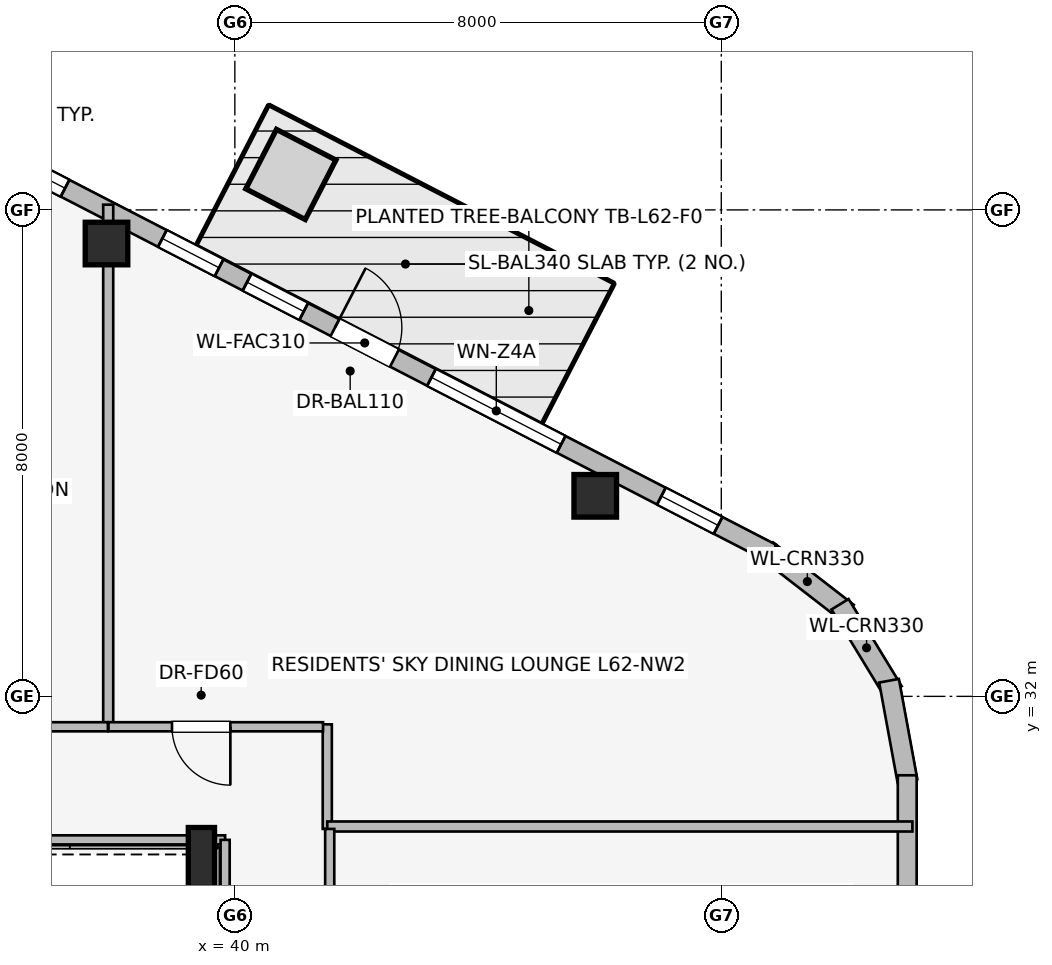
"""IFC4 building model, lengths in metres.
Left out: names, types, materials, properties, quantities, classifications, styles, units other than length and angle.
Written with IfcOpenShell. Run it as: python <this file> out.ifc"""

import sys

from ifc_helpers import new_model, si_unit, direction, frame, frame_2d, origin, origin_2d, place, context, subcontext, project, spatial, rectangle, i_section, extrude, element, fill, save


model = new_model("IFC4")
c1 = context("Model", 3, precision=1e-05, world=origin(), true_north=direction((0.0, 1.0)))
c2 = subcontext(c1, "Body", "Model", "MODEL_VIEW")
j1 = project(units=[si_unit("LENGTHUNIT", "METRE"), si_unit("PLANEANGLEUNIT", "RADIAN")], contexts=[c1])
p1 = place(None, origin())
s1 = spatial("IfcSite", under=j1, at=p1, CompositionType="ELEMENT")
p2 = place(p1, origin())
s2 = spatial("IfcBuilding", under=s1, at=p2, CompositionType="ELEMENT")
p3 = place(p2, frame((0.0, 0.0, 227.7)))
s3 = spatial("IfcBuildingStorey", under=s2, at=p3, CompositionType="ELEMENT", Elevation=227.7)
for number, where, z_axis, x_axis in (
    (1, (45.927, 35.298, 0.0), (0.0, 0.0, 1.0), (1.0, 0.0, 0.0)),
    (2, (37.889, 39.447, 0.0), (0.0, 0.0, 1.0), (1.0, 0.0, 0.0)),
):
    element("IfcColumn", number, at=place(p3, frame(where, z_axis=z_axis, x_axis=x_axis)), inside=s3, PredefinedType="COLUMN", context=c2, shape_type="SweptSolid", body=[
        extrude(rectangle(XDim=0.7, YDim=0.7, at=origin_2d()), origin(), (0.0, 0.0, 1.0), 3.55),
    ])
p4 = place(p3, frame((39.45, 29.35, 0.0), z_axis=(0.0, 0.0, 1.0), x_axis=(1.0, 0.0, 0.0)))
e3 = element("IfcColumn", 3, at=p4, inside=s3, PredefinedType="COLUMN", context=c2, shape_type="SweptSolid", body=[
    extrude(i_section(OverallWidth=0.431, OverallDepth=0.987, WebThickness=0.034, FlangeThickness=0.062, at=origin_2d()), origin(), (0.0, 0.0, 1.0), 3.55),
])
p5 = place(p3, frame((48.753, 34.401, 0.0), z_axis=(0.0, 0.0, 1.0), x_axis=(0.790691856293, -0.61221433207, 0.0)))
e4 = element("IfcWall", 4, at=p5, inside=s3, PredefinedType="STANDARD", context=c2, shape_type="SweptSolid", body=[
    extrude(rectangle(XDim=1.676, YDim=0.33, at=frame_2d((0.838, 0.0))), origin(), (0.0, 0.0, 1.0), 3.29),
])
p6 = place(p3, frame((49.953, 33.515, 0.0), z_axis=(0.0, 0.0, 1.0), x_axis=(0.520325409202, -0.853968072318, 0.0)))
e5 = element("IfcWall", 5, at=p6, inside=s3, PredefinedType="STANDARD", context=c2, shape_type="SweptSolid", body=[
    extrude(rectangle(XDim=1.678, YDim=0.33, at=frame_2d((0.839, 0.0))), origin(), (0.0, 0.0, 1.0), 3.29),
])
p7 = place(p3, frame((50.759, 32.257, 0.0), z_axis=(0.0, 0.0, 1.0), x_axis=(0.180691763044, -0.983539773862, 0.0)))
e6 = element("IfcWall", 6, at=p7, inside=s3, PredefinedType="STANDARD", context=c2, shape_type="SweptSolid", body=[
    extrude(rectangle(XDim=1.677, YDim=0.33, at=frame_2d((0.838, 0.0))), origin(), (0.0, 0.0, 1.0), 3.29),
])
p8 = place(p3, frame((35.437, 41.27, 0.0), z_axis=(0.0, 0.0, 1.0), x_axis=(0.888581481622, -0.458718814218, 0.0)))
e7 = element("IfcWall", 7, at=p8, inside=s3, PredefinedType="STANDARD", context=c2, shape_type="SweptSolid", body=[
    extrude(rectangle(XDim=15.077, YDim=0.31, at=frame_2d((7.539, 0.0))), origin(), (0.0, 0.0, 1.0), 3.29),
])
p9 = place(p8, frame((6.988, 0.0, 0.0)))
e8 = element("IfcOpeningElement", 8, at=p9, cuts=e7, PredefinedType="OPENING", context=c2, shape_type="SweptSolid", body=[
    extrude(rectangle(XDim=1.1, YDim=2.04, at=frame_2d((0.55, 1.02))), frame((0.0, 0.165, 0.0), z_axis=(0.0, -1.0, 0.0), x_axis=(1.0, 0.0, 0.0)), (0.0, 0.0, 1.0), 0.33),
])
p10 = place(p8, frame((0.942, 0.0, 0.75)))
e9 = element("IfcOpeningElement", 9, at=p10, cuts=e7, PredefinedType="OPENING", context=c2, shape_type="SweptSolid", body=[
    extrude(rectangle(XDim=1.05, YDim=1.4, at=frame_2d((0.525, 0.7))), frame((0.0, 0.165, 0.0), z_axis=(0.0, -1.0, 0.0), x_axis=(1.0, 0.0, 0.0)), (0.0, 0.0, 1.0), 0.33),
])
p11 = place(p8, frame((3.793, 0.0, 0.75)))
e10 = element("IfcOpeningElement", 10, at=p11, cuts=e7, PredefinedType="OPENING", context=c2, shape_type="SweptSolid", body=[
    extrude(rectangle(XDim=1.05, YDim=1.4, at=frame_2d((0.525, 0.7))), frame((0.0, 0.165, 0.0), z_axis=(0.0, -1.0, 0.0), x_axis=(1.0, 0.0, 0.0)), (0.0, 0.0, 1.0), 0.33),
])
p12 = place(p8, frame((5.36, 0.0, 0.75)))
e11 = element("IfcOpeningElement", 11, at=p12, cuts=e7, PredefinedType="OPENING", context=c2, shape_type="SweptSolid", body=[
    extrude(rectangle(XDim=1.05, YDim=1.4, at=frame_2d((0.525, 0.7))), frame((0.0, 0.165, 0.0), z_axis=(0.0, -1.0, 0.0), x_axis=(1.0, 0.0, 0.0)), (0.0, 0.0, 1.0), 0.33),
])
p13 = place(p8, frame((8.774, 0.0, 0.75)))
e12 = element("IfcOpeningElement", 12, at=p13, cuts=e7, PredefinedType="OPENING", context=c2, shape_type="SweptSolid", body=[
    extrude(rectangle(XDim=2.4, YDim=1.6, at=frame_2d((1.2, 0.8))), frame((0.0, 0.165, 0.0), z_axis=(0.0, -1.0, 0.0), x_axis=(1.0, 0.0, 0.0)), (0.0, 0.0, 1.0), 0.33),
])
p14 = place(p8, frame((13.029, 0.0, 0.75)))
e13 = element("IfcOpeningElement", 13, at=p14, cuts=e7, PredefinedType="OPENING", context=c2, shape_type="SweptSolid", body=[
    extrude(rectangle(XDim=1.05, YDim=1.4, at=frame_2d((0.525, 0.7))), frame((0.0, 0.165, 0.0), z_axis=(0.0, -1.0, 0.0), x_axis=(1.0, 0.0, 0.0)), (0.0, 0.0, 1.0), 0.33),
])
p15 = place(p3, frame((51.058, 30.702, 0.0), z_axis=(0.0, 0.0, 1.0), x_axis=(0.0, -1.0, 0.0)))
e14 = element("IfcWall", 14, at=p15, inside=s3, PredefinedType="STANDARD", context=c2, shape_type="SweptSolid", body=[
    extrude(rectangle(XDim=13.404, YDim=0.31, at=frame_2d((6.702, 0.0))), origin(), (0.0, 0.0, 1.0), 3.29),
])
p16 = place(p15, frame((5.386, 0.0, 0.75)))
e15 = element("IfcOpeningElement", 15, at=p16, cuts=e14, PredefinedType="OPENING", context=c2, shape_type="SweptSolid", body=[
    extrude(rectangle(XDim=2.4, YDim=1.6, at=frame_2d((1.2, 0.8))), frame((0.0, 0.165, 0.0), z_axis=(0.0, -1.0, 0.0), x_axis=(1.0, 0.0, 0.0)), (0.0, 0.0, 1.0), 0.33),
])
p17 = place(p15, frame((9.04, 0.0, 0.75)))
e16 = element("IfcOpeningElement", 16, at=p17, cuts=e14, PredefinedType="OPENING", context=c2, shape_type="SweptSolid", body=[
    extrude(rectangle(XDim=1.05, YDim=1.4, at=frame_2d((0.525, 0.7))), frame((0.0, 0.165, 0.0), z_axis=(0.0, -1.0, 0.0), x_axis=(1.0, 0.0, 0.0)), (0.0, 0.0, 1.0), 0.33),
])
p18 = place(p3, frame((39.84, 29.64, 0.0), z_axis=(0.0, 0.0, 1.0), x_axis=(-1.0, 0.0, 0.0)))
e17 = element("IfcWall", 17, at=p18, inside=s3, PredefinedType="PARTITIONING", context=c2, shape_type="SweptSolid", body=[
    extrude(rectangle(XDim=12.203, YDim=0.15, at=frame_2d((6.102, 0.0))), origin(), (0.0, 0.0, 1.0), 2.431),
])
p19 = place(p3, frame((39.84, 18.36, 0.0), z_axis=(0.0, 0.0, 1.0), x_axis=(0.0, 1.0, 0.0)))
e18 = element("IfcWall", 18, at=p19, inside=s3, PredefinedType="PARTITIONING", context=c2, shape_type="SweptSolid", body=[
    extrude(rectangle(XDim=11.28, YDim=0.15, at=frame_2d((5.64, 0.0))), origin(), (0.0, 0.0, 1.0), 3.29),
])
p20 = place(p3, frame((41.52, 29.82, 0.0), z_axis=(0.0, 0.0, 1.0), x_axis=(0.0, 1.0, 0.0)))
e19 = element("IfcWall", 19, at=p20, inside=s3, PredefinedType="PARTITIONING", context=c2, shape_type="SweptSolid", body=[
    extrude(rectangle(XDim=1.72, YDim=0.15, at=frame_2d((0.86, 0.0))), origin(), (0.0, 0.0, 1.0), 3.29),
])
p21 = place(p3, frame((37.917, 31.51, 0.0), z_axis=(0.0, 0.0, 1.0), x_axis=(0.0, 1.0, 0.0)))
e20 = element("IfcWall", 20, at=p21, inside=s3, PredefinedType="PARTITIONING", context=c2, shape_type="SweptSolid", body=[
    extrude(rectangle(XDim=8.576, YDim=0.165, at=frame_2d((4.288, 0.0))), origin(), (0.0, 0.0, 1.0), 2.679),
])
p22 = place(p3, frame((37.912, 31.5, 0.0), z_axis=(0.0, 0.0, 1.0), x_axis=(-1.0, 0.0, 0.0)))
e21 = element("IfcWall", 21, at=p22, inside=s3, PredefinedType="PARTITIONING", context=c2, shape_type="SweptSolid", body=[
    extrude(rectangle(XDim=3.622, YDim=0.15, at=frame_2d((1.811, 0.0))), origin(), (0.0, 0.0, 1.0), 3.29),
])
p23 = place(p22, frame((1.212, 0.0, 0.0)))
e22 = element("IfcOpeningElement", 22, at=p23, cuts=e21, PredefinedType="OPENING", context=c2, shape_type="SweptSolid", body=[
    extrude(rectangle(XDim=0.96, YDim=2.0, at=frame_2d((0.48, 1.0))), frame((0.0, 0.085, 0.0), z_axis=(0.0, -1.0, 0.0), x_axis=(1.0, 0.0, 0.0)), (0.0, 0.0, 1.0), 0.17),
])
p24 = place(p3, frame((41.45, 31.5, 0.0), z_axis=(0.0, 0.0, 1.0), x_axis=(-1.0, 0.0, 0.0)))
e23 = element("IfcWall", 23, at=p24, inside=s3, PredefinedType="PARTITIONING", context=c2, shape_type="SweptSolid", body=[
    extrude(rectangle(XDim=3.528, YDim=0.15, at=frame_2d((1.764, 0.0))), origin(), (0.0, 0.0, 1.0), 3.29),
])
p25 = place(p24, frame((1.524, 0.0, 0.0)))
e24 = element("IfcOpeningElement", 24, at=p25, cuts=e23, PredefinedType="OPENING", context=c2, shape_type="SweptSolid", body=[
    extrude(rectangle(XDim=0.96, YDim=2.0, at=frame_2d((0.48, 1.0))), frame((0.0, 0.085, 0.0), z_axis=(0.0, -1.0, 0.0), x_axis=(1.0, 0.0, 0.0)), (0.0, 0.0, 1.0), 0.17),
])
p26 = place(p3, frame((41.52, 29.86, 0.0), z_axis=(0.0, 0.0, 1.0), x_axis=(1.0, 0.0, 0.0)))
e25 = element("IfcWall", 25, at=p26, inside=s3, PredefinedType="PARTITIONING", context=c2, shape_type="SweptSolid", body=[
    extrude(rectangle(XDim=9.623, YDim=0.165, at=frame_2d((4.812, 0.0))), origin(), (0.0, 0.0, 1.0), 3.29),
])
p27 = place(p3, frame((41.56, 26.113, 0.0), z_axis=(0.0, 0.0, 1.0), x_axis=(0.0, 1.0, 0.0)))
e26 = element("IfcWall", 26, at=p27, inside=s3, PredefinedType="PARTITIONING", context=c2, shape_type="SweptSolid", body=[
    extrude(rectangle(XDim=3.707, YDim=0.15, at=frame_2d((1.854, 0.0))), origin(), (0.0, 0.0, 1.0), 3.29),
])
p28 = place(p27, frame((1.374, 0.0, 0.0)))
e27 = element("IfcOpeningElement", 27, at=p28, cuts=e26, PredefinedType="OPENING", context=c2, shape_type="SweptSolid", body=[
    extrude(rectangle(XDim=0.96, YDim=2.0, at=frame_2d((0.48, 1.0))), frame((0.0, 0.085, 0.0), z_axis=(0.0, -1.0, 0.0), x_axis=(1.0, 0.0, 0.0)), (0.0, 0.0, 1.0), 0.17),
])
p29 = place(p9, origin())
e28 = element("IfcDoor", 28, at=p29, inside=s3, OperationType="SINGLE_SWING_LEFT", PredefinedType="DOOR", context=c2, shape_type="SweptSolid", body=[
    extrude(rectangle(XDim=1.1, YDim=2.04, at=frame_2d((0.55, 1.02))), frame((0.0, 0.025, 0.0), z_axis=(0.0, -1.0, 0.0), x_axis=(1.0, 0.0, 0.0)), (0.0, 0.0, 1.0), 0.05),
])
fill(e8, e28)
p30 = place(p10, origin())
e29 = element("IfcWindow", 29, at=p30, inside=s3, PartitioningType="SINGLE_PANEL", PredefinedType="WINDOW", context=c2, shape_type="SweptSolid", body=[
    extrude(rectangle(XDim=1.05, YDim=1.4, at=frame_2d((0.525, 0.7))), frame((0.0, 0.03, 0.0), z_axis=(0.0, -1.0, 0.0), x_axis=(1.0, 0.0, 0.0)), (0.0, 0.0, 1.0), 0.06),
])
fill(e9, e29)
p31 = place(p11, origin())
e30 = element("IfcWindow", 30, at=p31, inside=s3, PartitioningType="SINGLE_PANEL", PredefinedType="WINDOW", context=c2, shape_type="SweptSolid", body=[
    extrude(rectangle(XDim=1.05, YDim=1.4, at=frame_2d((0.525, 0.7))), frame((0.0, 0.03, 0.0), z_axis=(0.0, -1.0, 0.0), x_axis=(1.0, 0.0, 0.0)), (0.0, 0.0, 1.0), 0.06),
])
fill(e10, e30)
p32 = place(p12, origin())
e31 = element("IfcWindow", 31, at=p32, inside=s3, PartitioningType="SINGLE_PANEL", PredefinedType="WINDOW", context=c2, shape_type="SweptSolid", body=[
    extrude(rectangle(XDim=1.05, YDim=1.4, at=frame_2d((0.525, 0.7))), frame((0.0, 0.03, 0.0), z_axis=(0.0, -1.0, 0.0), x_axis=(1.0, 0.0, 0.0)), (0.0, 0.0, 1.0), 0.06),
])
fill(e11, e31)
p33 = place(p13, origin())
e32 = element("IfcWindow", 32, at=p33, inside=s3, PartitioningType="SINGLE_PANEL", PredefinedType="WINDOW", context=c2, shape_type="SweptSolid", body=[
    extrude(rectangle(XDim=2.4, YDim=1.6, at=frame_2d((1.2, 0.8))), frame((0.0, 0.03, 0.0), z_axis=(0.0, -1.0, 0.0), x_axis=(1.0, 0.0, 0.0)), (0.0, 0.0, 1.0), 0.06),
])
fill(e12, e32)
p34 = place(p14, origin())
e33 = element("IfcWindow", 33, at=p34, inside=s3, PartitioningType="SINGLE_PANEL", PredefinedType="WINDOW", context=c2, shape_type="SweptSolid", body=[
    extrude(rectangle(XDim=1.05, YDim=1.4, at=frame_2d((0.525, 0.7))), frame((0.0, 0.03, 0.0), z_axis=(0.0, -1.0, 0.0), x_axis=(1.0, 0.0, 0.0)), (0.0, 0.0, 1.0), 0.06),
])
fill(e13, e33)
p35 = place(p25, origin())
e34 = element("IfcDoor", 34, at=p35, inside=s3, OperationType="SINGLE_SWING_LEFT", PredefinedType="DOOR", context=c2, shape_type="SweptSolid", body=[
    extrude(rectangle(XDim=0.96, YDim=2.0, at=frame_2d((0.48, 1.0))), frame((0.0, 0.025, 0.0), z_axis=(0.0, -1.0, 0.0), x_axis=(1.0, 0.0, 0.0)), (0.0, 0.0, 1.0), 0.05),
])
fill(e24, e34)
save(model, sys.argv[1])
